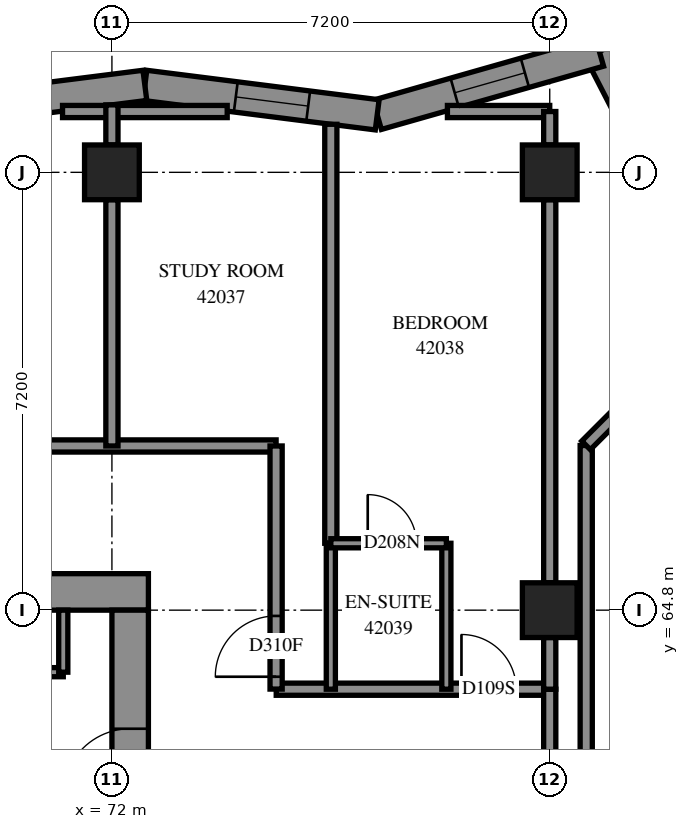
"""IFC4 building model, lengths in metres.
Left out: names, types, materials, properties, quantities, classifications, styles, units other than length and angle.
Written with IfcOpenShell. Run it as: python <this file> out.ifc"""

import sys

from ifc_helpers import new_model, si_unit, direction, frame, frame_2d, origin, origin_2d, place, context, subcontext, project, spatial, polyline, rectangle, outline, extrude, element, fill, save


model = new_model("IFC4")
c1 = context("Model", 3, precision=1e-05, world=origin(), true_north=direction((0.0, 1.0)))
c2 = subcontext(c1, "Body", "Model", "MODEL_VIEW")
j1 = project(units=[si_unit("LENGTHUNIT", "METRE"), si_unit("PLANEANGLEUNIT", "RADIAN")], contexts=[c1])
p1 = place(None, origin())
s1 = spatial("IfcSite", under=j1, at=p1, CompositionType="ELEMENT")
p2 = place(p1, origin())
s2 = spatial("IfcBuilding", under=s1, at=p2, CompositionType="ELEMENT")
p3 = place(p2, frame((0.0, 0.0, 155.8)))
s3 = spatial("IfcBuildingStorey", under=s2, at=p3, CompositionType="ELEMENT", Elevation=155.8)
for number, where, z_axis, x_axis in (
    (1, (72.0, 72.0, 0.0), (0.0, 0.0, 1.0), (1.0, 0.0, 0.0)),
    (2, (79.2, 64.8, 0.0), (0.0, 0.0, 1.0), (1.0, 0.0, 0.0)),
    (3, (79.2, 72.0, 0.0), (0.0, 0.0, 1.0), (1.0, 0.0, 0.0)),
):
    element("IfcColumn", number, at=place(p3, frame(where, z_axis=z_axis, x_axis=x_axis)), inside=s3, PredefinedType="COLUMN", context=c2, shape_type="SweptSolid", body=[
        extrude(rectangle(XDim=0.9, YDim=0.9, at=origin_2d()), origin(), (0.0, 0.0, 1.0), 3.1),
    ])
p4 = place(p3, frame((57.0, 65.1, -0.3), z_axis=(0.0, 0.0, 1.0), x_axis=(1.0, 0.0, 0.0)))
e4 = element("IfcWall", 4, at=p4, inside=s3, PredefinedType="SHEAR", context=c2, shape_type="SweptSolid", body=[
    extrude(rectangle(XDim=15.6, YDim=0.6, at=frame_2d((7.8, 0.0))), origin(), (0.0, 0.0, 1.0), 2.7),
])
p5 = place(p4, frame((10.6, 0.0, 0.3)))
e5 = element("IfcOpeningElement", 5, at=p5, cuts=e4, PredefinedType="OPENING", context=c2, shape_type="SweptSolid", body=[
    extrude(rectangle(XDim=0.8, YDim=2.1, at=frame_2d((0.4, 1.05))), frame((0.0, 0.31, 0.0), z_axis=(0.0, -1.0, 0.0), x_axis=(1.0, 0.0, 0.0)), (0.0, 0.0, 1.0), 0.62),
])
p6 = place(p3, frame((72.3, 50.4, -0.3), z_axis=(0.0, 0.0, 1.0), x_axis=(0.0, 1.0, 0.0)))
e6 = element("IfcWall", 6, at=p6, inside=s3, PredefinedType="SHEAR", context=c2, shape_type="SweptSolid", body=[
    extrude(rectangle(XDim=14.4, YDim=0.6, at=frame_2d((7.2, 0.0))), origin(), (0.0, 0.0, 1.0), 2.7),
])
p7 = place(p6, frame((4.55, 0.0, 0.3)))
e7 = element("IfcOpeningElement", 7, at=p7, cuts=e6, PredefinedType="OPENING", context=c2, shape_type="SweptSolid", body=[
    extrude(rectangle(XDim=1.1, YDim=2.1, at=frame_2d((0.55, 1.05))), frame((0.0, 0.31, 0.0), z_axis=(0.0, -1.0, 0.0), x_axis=(1.0, 0.0, 0.0)), (0.0, 0.0, 1.0), 0.62),
])
p8 = place(p6, frame((11.35, 0.0, 0.3)))
e8 = element("IfcOpeningElement", 8, at=p8, cuts=e6, PredefinedType="OPENING", context=c2, shape_type="SweptSolid", body=[
    extrude(rectangle(XDim=1.1, YDim=2.1, at=frame_2d((0.55, 1.05))), frame((0.0, 0.31, 0.0), z_axis=(0.0, -1.0, 0.0), x_axis=(1.0, 0.0, 0.0)), (0.0, 0.0, 1.0), 0.62),
])
p9 = place(p3, frame((81.573, 70.962, 0.0), z_axis=(0.0, 0.0, 1.0), x_axis=(-0.4577692458, 0.8890710419, 0.0)))
e9 = element("IfcWall", 9, at=p9, inside=s3, PredefinedType="SOLIDWALL", context=c2, shape_type="SweptSolid", body=[
    extrude(outline(polyline([(0.057, -0.25), (3.605, -0.25), (3.196, 0.25), (-0.057, 0.25), (0.057, -0.25)])), origin(), (0.0, 0.0, 1.0), 3.1),
])
p10 = place(p9, frame((0.766, 0.0, 0.45)))
e10 = element("IfcOpeningElement", 10, at=p10, cuts=e9, PredefinedType="OPENING", context=c2, shape_type="SweptSolid", body=[
    extrude(rectangle(XDim=1.2, YDim=2.5, at=frame_2d((0.6, 1.25))), frame((0.0, 0.26, 0.0), z_axis=(0.0, -1.0, 0.0), x_axis=(1.0, 0.0, 0.0)), (0.0, 0.0, 1.0), 0.52),
])
p11 = place(p3, frame((80.017, 73.986, 0.0), z_axis=(0.0, 0.0, 1.0), x_axis=(-0.961808503, -0.2737232245, 0.0)))
e11 = element("IfcWall", 11, at=p11, inside=s3, PredefinedType="SOLIDWALL", context=c2, shape_type="SweptSolid", body=[
    extrude(outline(polyline([(-0.205, -0.25), (3.748, -0.25), (3.85, 0.25), (0.205, 0.25), (-0.205, -0.25)])), origin(), (0.0, 0.0, 1.0), 3.1),
])
p12 = place(p11, frame((1.274, 0.0, 0.45)))
e12 = element("IfcOpeningElement", 12, at=p12, cuts=e11, PredefinedType="OPENING", context=c2, shape_type="SweptSolid", body=[
    extrude(rectangle(XDim=1.2, YDim=2.5, at=frame_2d((0.6, 1.25))), frame((0.0, 0.26, 0.0), z_axis=(0.0, -1.0, 0.0), x_axis=(1.0, 0.0, 0.0)), (0.0, 0.0, 1.0), 0.52),
])
p13 = place(p3, frame((76.363, 72.946, 0.0), z_axis=(0.0, 0.0, 1.0), x_axis=(-0.9920594601, 0.1257697408, 0.0)))
e13 = element("IfcWall", 13, at=p13, inside=s3, PredefinedType="SOLIDWALL", context=c2, shape_type="SweptSolid", body=[
    extrude(outline(polyline([(0.051, -0.25), (3.883, -0.25), (3.82, 0.25), (-0.051, 0.25), (0.051, -0.25)])), origin(), (0.0, 0.0, 1.0), 3.1),
])
p14 = place(p13, frame((1.144, 0.0, 0.45)))
e14 = element("IfcOpeningElement", 14, at=p14, cuts=e13, PredefinedType="OPENING", context=c2, shape_type="SweptSolid", body=[
    extrude(rectangle(XDim=1.2, YDim=2.5, at=frame_2d((0.6, 1.25))), frame((0.0, 0.26, 0.0), z_axis=(0.0, -1.0, 0.0), x_axis=(1.0, 0.0, 0.0)), (0.0, 0.0, 1.0), 0.52),
])
p15 = place(p3, frame((72.542, 73.43, 0.0), z_axis=(0.0, 0.0, 1.0), x_axis=(-0.9920583495, -0.1257785003, 0.0)))
e15 = element("IfcWall", 15, at=p15, inside=s3, PredefinedType="SOLIDWALL", context=c2, shape_type="SweptSolid", body=[
    extrude(outline(polyline([(-0.032, -0.25), (3.8, -0.25), (3.864, 0.25), (0.032, 0.25), (-0.032, -0.25)])), origin(), (0.0, 0.0, 1.0), 3.1),
])
p16 = place(p15, frame((1.593, 0.0, 0.7)))
e16 = element("IfcOpeningElement", 16, at=p16, cuts=e15, PredefinedType="OPENING", context=c2, shape_type="SweptSolid", body=[
    extrude(rectangle(XDim=1.8, YDim=2.2, at=frame_2d((0.9, 1.1))), frame((0.0, 0.26, 0.0), z_axis=(0.0, -1.0, 0.0), x_axis=(1.0, 0.0, 0.0)), (0.0, 0.0, 1.0), 0.52),
])
p17 = place(p3, frame((64.95, 63.78, 0.0), z_axis=(0.0, 0.0, 1.0), x_axis=(1.0, 0.0, 0.0)))
e17 = element("IfcWall", 17, at=p17, inside=s3, PredefinedType="PARTITIONING", context=c2, shape_type="SweptSolid", body=[
    extrude(rectangle(XDim=6.25, YDim=0.15, at=frame_2d((3.125, 0.0))), origin(), (0.0, 0.0, 1.0), 3.1),
])
p18 = place(p3, frame((71.2, 63.78, 0.0), z_axis=(0.0, 0.0, 1.0), x_axis=(0.0, 1.0, 0.0)))
e18 = element("IfcWall", 18, at=p18, inside=s3, PredefinedType="PARTITIONING", context=c2, shape_type="SweptSolid", body=[
    extrude(rectangle(XDim=1.02, YDim=0.15, at=frame_2d((0.51, 0.0))), origin(), (0.0, 0.0, 1.0), 3.1),
])
p19 = place(p3, frame((54.9, 67.5, 0.0), z_axis=(0.0, 0.0, 1.0), x_axis=(1.0, 0.0, 0.0)))
e19 = element("IfcWall", 19, at=p19, inside=s3, PredefinedType="PARTITIONING", context=c2, shape_type="SweptSolid", body=[
    extrude(rectangle(XDim=19.8, YDim=0.2, at=frame_2d((9.9, 0.0))), origin(), (0.0, 0.0, 1.0), 3.1),
])
p20 = place(p19, frame((6.599, 0.0, 0.0)))
e20 = element("IfcOpeningElement", 20, at=p20, cuts=e19, PredefinedType="OPENING", context=c2, shape_type="SweptSolid", body=[
    extrude(rectangle(XDim=0.9, YDim=2.1, at=frame_2d((0.45, 1.05))), frame((0.0, 0.11, 0.0), z_axis=(0.0, -1.0, 0.0), x_axis=(1.0, 0.0, 0.0)), (0.0, 0.0, 1.0), 0.22),
])
p21 = place(p19, frame((13.799, 0.0, 0.0)))
e21 = element("IfcOpeningElement", 21, at=p21, cuts=e19, PredefinedType="OPENING", context=c2, shape_type="SweptSolid", body=[
    extrude(rectangle(XDim=0.9, YDim=2.1, at=frame_2d((0.45, 1.05))), frame((0.0, 0.11, 0.0), z_axis=(0.0, -1.0, 0.0), x_axis=(1.0, 0.0, 0.0)), (0.0, 0.0, 1.0), 0.22),
])
p22 = place(p3, frame((79.8, 56.054, 0.0), z_axis=(0.0, 0.0, 1.0), x_axis=(0.0, 1.0, 0.0)))
e22 = element("IfcWall", 22, at=p22, inside=s3, PredefinedType="PARTITIONING", context=c2, shape_type="SweptSolid", body=[
    extrude(rectangle(XDim=11.454, YDim=0.2, at=frame_2d((5.727, 0.0))), origin(), (0.0, 0.0, 1.0), 3.1),
])
p23 = place(p3, frame((79.799, 56.055, 0.0), z_axis=(0.0, 0.0, 1.0), x_axis=(0.7071067812, 0.7071067812, 0.0)))
e23 = element("IfcWall", 23, at=p23, inside=s3, PredefinedType="PARTITIONING", context=c2, shape_type="SweptSolid", body=[
    extrude(rectangle(XDim=9.95, YDim=0.2, at=frame_2d((4.975, 0.0))), origin(), (0.0, 0.0, 1.0), 3.1),
])
p24 = place(p23, frame((1.071, 0.0, 0.0)))
e24 = element("IfcOpeningElement", 24, at=p24, cuts=e23, PredefinedType="OPENING", context=c2, shape_type="SweptSolid", body=[
    extrude(rectangle(XDim=1.0, YDim=2.1, at=frame_2d((0.5, 1.05))), frame((0.0, 0.11, 0.0), z_axis=(0.0, -1.0, 0.0), x_axis=(1.0, 0.0, 0.0)), (0.0, 0.0, 1.0), 0.22),
])
p25 = place(p3, frame((75.6, 65.9, 0.0), z_axis=(0.0, 0.0, 1.0), x_axis=(0.0, 1.0, 0.0)))
e25 = element("IfcWall", 25, at=p25, inside=s3, PredefinedType="PARTITIONING", context=c2, shape_type="SweptSolid", body=[
    extrude(rectangle(XDim=6.89, YDim=0.2, at=frame_2d((3.445, 0.0))), origin(), (0.0, 0.0, 1.0), 3.1),
])
p26 = place(p3, frame((79.2, 65.25, 0.0), z_axis=(0.0, 0.0, 1.0), x_axis=(0.0, 1.0, 0.0)))
e26 = element("IfcWall", 26, at=p26, inside=s3, PredefinedType="PARTITIONING", context=c2, shape_type="SweptSolid", body=[
    extrude(rectangle(XDim=6.3, YDim=0.2, at=frame_2d((3.15, 0.0))), origin(), (0.0, 0.0, 1.0), 3.1),
])
p27 = place(p3, frame((74.702, 63.5, 0.0), z_axis=(0.0, 0.0, 1.0), x_axis=(1.0, 0.0, 0.0)))
e27 = element("IfcWall", 27, at=p27, inside=s3, PredefinedType="PARTITIONING", context=c2, shape_type="SweptSolid", body=[
    extrude(rectangle(XDim=4.498, YDim=0.2, at=frame_2d((2.249, 0.0))), origin(), (0.0, 0.0, 1.0), 3.1),
])
p28 = place(p27, frame((3.046, 0.0, 0.0)))
e28 = element("IfcOpeningElement", 28, at=p28, cuts=e27, PredefinedType="OPENING", context=c2, shape_type="SweptSolid", body=[
    extrude(rectangle(XDim=0.9, YDim=2.1, at=frame_2d((0.45, 1.05))), frame((0.0, 0.11, 0.0), z_axis=(0.0, -1.0, 0.0), x_axis=(1.0, 0.0, 0.0)), (0.0, 0.0, 1.0), 0.22),
])
p29 = place(p3, frame((72.0, 67.5, 0.0), z_axis=(0.0, 0.0, 1.0), x_axis=(0.0, 1.0, 0.0)))
e29 = element("IfcWall", 29, at=p29, inside=s3, PredefinedType="PARTITIONING", context=c2, shape_type="SweptSolid", body=[
    extrude(rectangle(XDim=4.05, YDim=0.2, at=frame_2d((2.025, 0.0))), origin(), (0.0, 0.0, 1.0), 3.1),
])
p30 = place(p3, frame((74.7, 63.502, 0.0), z_axis=(0.0, 0.0, 1.0), x_axis=(0.0, 1.0, 0.0)))
e30 = element("IfcWall", 30, at=p30, inside=s3, PredefinedType="PARTITIONING", context=c2, shape_type="SweptSolid", body=[
    extrude(rectangle(XDim=3.998, YDim=0.2, at=frame_2d((1.999, 0.0))), origin(), (0.0, 0.0, 1.0), 3.1),
])
p31 = place(p30, frame((0.203, 0.0, 0.0)))
e31 = element("IfcOpeningElement", 31, at=p31, cuts=e30, PredefinedType="OPENING", context=c2, shape_type="SweptSolid", body=[
    extrude(rectangle(XDim=1.0, YDim=2.1, at=frame_2d((0.5, 1.05))), frame((0.0, 0.11, 0.0), z_axis=(0.0, -1.0, 0.0), x_axis=(1.0, 0.0, 0.0)), (0.0, 0.0, 1.0), 0.22),
])
p32 = place(p3, frame((79.797, 67.51, 0.0), z_axis=(0.0, 0.0, 1.0), x_axis=(0.7068437799, 0.7073696847, 0.0)))
e32 = element("IfcWall", 32, at=p32, inside=s3, PredefinedType="PARTITIONING", context=c2, shape_type="SweptSolid", body=[
    extrude(rectangle(XDim=3.613, YDim=0.2, at=frame_2d((1.806, 0.0))), origin(), (0.0, 0.0, 1.0), 3.1),
])
p33 = place(p3, frame((71.188, 73.0, 0.0), z_axis=(0.0, 0.0, 1.0), x_axis=(1.0, 0.0, 0.0)))
e33 = element("IfcWall", 33, at=p33, inside=s3, PredefinedType="PARTITIONING", context=c2, shape_type="SweptSolid", body=[
    extrude(rectangle(XDim=2.708, YDim=0.2, at=frame_2d((1.354, 0.0))), origin(), (0.0, 0.0, 1.0), 3.1),
])
for number, where, z_axis, x_axis in (
    (34, (75.6, 63.5, 0.0), (0.0, 0.0, 1.0), (0.0, 1.0, 0.0)),
    (35, (77.5, 63.5, 0.0), (0.0, 0.0, 1.0), (0.0, 1.0, 0.0)),
):
    element("IfcWall", number, at=place(p3, frame(where, z_axis=z_axis, x_axis=x_axis)), inside=s3, PredefinedType="PARTITIONING", context=c2, shape_type="SweptSolid", body=[
        extrude(rectangle(XDim=2.4, YDim=0.15, at=frame_2d((1.2, 0.0))), origin(), (0.0, 0.0, 1.0), 3.1),
    ])
p34 = place(p3, frame((79.2, 61.3, 0.0), z_axis=(0.0, 0.0, 1.0), x_axis=(0.0, 1.0, 0.0)))
e36 = element("IfcWall", 36, at=p34, inside=s3, PredefinedType="PARTITIONING", context=c2, shape_type="SweptSolid", body=[
    extrude(rectangle(XDim=2.2, YDim=0.2, at=frame_2d((1.1, 0.0))), origin(), (0.0, 0.0, 1.0), 3.1),
])
p35 = place(p3, frame((75.6, 65.9, 0.0), z_axis=(0.0, 0.0, 1.0), x_axis=(1.0, 0.0, 0.0)))
e37 = element("IfcWall", 37, at=p35, inside=s3, PredefinedType="PARTITIONING", context=c2, shape_type="SweptSolid", body=[
    extrude(rectangle(XDim=1.9, YDim=0.15, at=frame_2d((0.95, 0.0))), origin(), (0.0, 0.0, 1.0), 3.1),
])
p36 = place(p35, frame((0.607, 0.0, 0.0)))
e38 = element("IfcOpeningElement", 38, at=p36, cuts=e37, PredefinedType="OPENING", context=c2, shape_type="SweptSolid", body=[
    extrude(rectangle(XDim=0.8, YDim=2.1, at=frame_2d((0.4, 1.05))), frame((0.0, 0.085, 0.0), z_axis=(0.0, -1.0, 0.0), x_axis=(1.0, 0.0, 0.0)), (0.0, 0.0, 1.0), 0.17),
])
p37 = place(p3, frame((77.517, 73.0, 0.0), z_axis=(0.0, 0.0, 1.0), x_axis=(1.0, 0.0, 0.0)))
e39 = element("IfcWall", 39, at=p37, inside=s3, PredefinedType="PARTITIONING", context=c2, shape_type="SweptSolid", body=[
    extrude(rectangle(XDim=1.683, YDim=0.2, at=frame_2d((0.841, 0.0))), origin(), (0.0, 0.0, 1.0), 3.1),
])
p38 = place(p3, frame((79.2, 63.5, 0.0), z_axis=(0.0, 0.0, 1.0), x_axis=(0.0, 1.0, 0.0)))
e40 = element("IfcWall", 40, at=p38, inside=s3, PredefinedType="PARTITIONING", context=c2, shape_type="SweptSolid", body=[
    extrude(rectangle(XDim=0.85, YDim=0.2, at=frame_2d((0.425, 0.0))), origin(), (0.0, 0.0, 1.0), 3.1),
])
p39 = place(p3, frame((72.0, 72.45, 0.0), z_axis=(0.0, 0.0, 1.0), x_axis=(0.0, 1.0, 0.0)))
e41 = element("IfcWall", 41, at=p39, inside=s3, PredefinedType="PARTITIONING", context=c2, shape_type="SweptSolid", body=[
    extrude(rectangle(XDim=0.659, YDim=0.2, at=frame_2d((0.33, 0.0))), origin(), (0.0, 0.0, 1.0), 3.1),
])
p40 = place(p3, frame((79.2, 72.45, 0.0), z_axis=(0.0, 0.0, 1.0), x_axis=(0.0, 1.0, 0.0)))
e42 = element("IfcWall", 42, at=p40, inside=s3, PredefinedType="PARTITIONING", context=c2, shape_type="SweptSolid", body=[
    extrude(rectangle(XDim=0.55, YDim=0.2, at=frame_2d((0.275, 0.0))), origin(), (0.0, 0.0, 1.0), 3.1),
])
p41 = place(p12, origin())
e43 = element("IfcWindow", 43, at=p41, inside=s3, PartitioningType="SINGLE_PANEL", PredefinedType="WINDOW", context=c2, shape_type="SweptSolid", body=[
    extrude(rectangle(XDim=1.2, YDim=2.5, at=frame_2d((0.6, 1.25))), frame((0.0, 0.18, 0.0), z_axis=(0.0, -1.0, 0.0), x_axis=(1.0, 0.0, 0.0)), (0.0, 0.0, 1.0), 0.06),
])
fill(e12, e43)
p42 = place(p14, origin())
e44 = element("IfcWindow", 44, at=p42, inside=s3, PartitioningType="SINGLE_PANEL", PredefinedType="WINDOW", context=c2, shape_type="SweptSolid", body=[
    extrude(rectangle(XDim=1.2, YDim=2.5, at=frame_2d((0.6, 1.25))), frame((0.0, 0.18, 0.0), z_axis=(0.0, -1.0, 0.0), x_axis=(1.0, 0.0, 0.0)), (0.0, 0.0, 1.0), 0.06),
])
fill(e14, e44)
p43 = place(p8, origin())
e45 = element("IfcDoor", 45, at=p43, inside=s3, OperationType="SINGLE_SWING_RIGHT", PredefinedType="DOOR", context=c2, shape_type="SweptSolid", body=[
    extrude(rectangle(XDim=1.1, YDim=2.1, at=frame_2d((0.55, 1.05))), frame((0.0, 0.025, 0.0), z_axis=(0.0, -1.0, 0.0), x_axis=(1.0, 0.0, 0.0)), (0.0, 0.0, 1.0), 0.05),
])
fill(e8, e45)
p44 = place(p31, origin())
e46 = element("IfcDoor", 46, at=p44, inside=s3, OperationType="SINGLE_SWING_RIGHT", PredefinedType="DOOR", context=c2, shape_type="SweptSolid", body=[
    extrude(rectangle(XDim=1.0, YDim=2.1, at=frame_2d((0.5, 1.05))), frame((0.0, 0.025, 0.0), z_axis=(0.0, -1.0, 0.0), x_axis=(1.0, 0.0, 0.0)), (0.0, 0.0, 1.0), 0.05),
])
fill(e31, e46)
p45 = place(p28, origin())
e47 = element("IfcDoor", 47, at=p45, inside=s3, OperationType="SINGLE_SWING_LEFT", PredefinedType="DOOR", context=c2, shape_type="SweptSolid", body=[
    extrude(rectangle(XDim=0.9, YDim=2.1, at=frame_2d((0.45, 1.05))), frame((0.0, 0.025, 0.0), z_axis=(0.0, -1.0, 0.0), x_axis=(1.0, 0.0, 0.0)), (0.0, 0.0, 1.0), 0.05),
])
fill(e28, e47)
p46 = place(p36, origin())
e48 = element("IfcDoor", 48, at=p46, inside=s3, OperationType="SINGLE_SWING_RIGHT", PredefinedType="DOOR", context=c2, shape_type="SweptSolid", body=[
    extrude(rectangle(XDim=0.8, YDim=2.1, at=frame_2d((0.4, 1.05))), frame((0.0, 0.025, 0.0), z_axis=(0.0, -1.0, 0.0), x_axis=(1.0, 0.0, 0.0)), (0.0, 0.0, 1.0), 0.05),
])
fill(e38, e48)
save(model, sys.argv[1])
